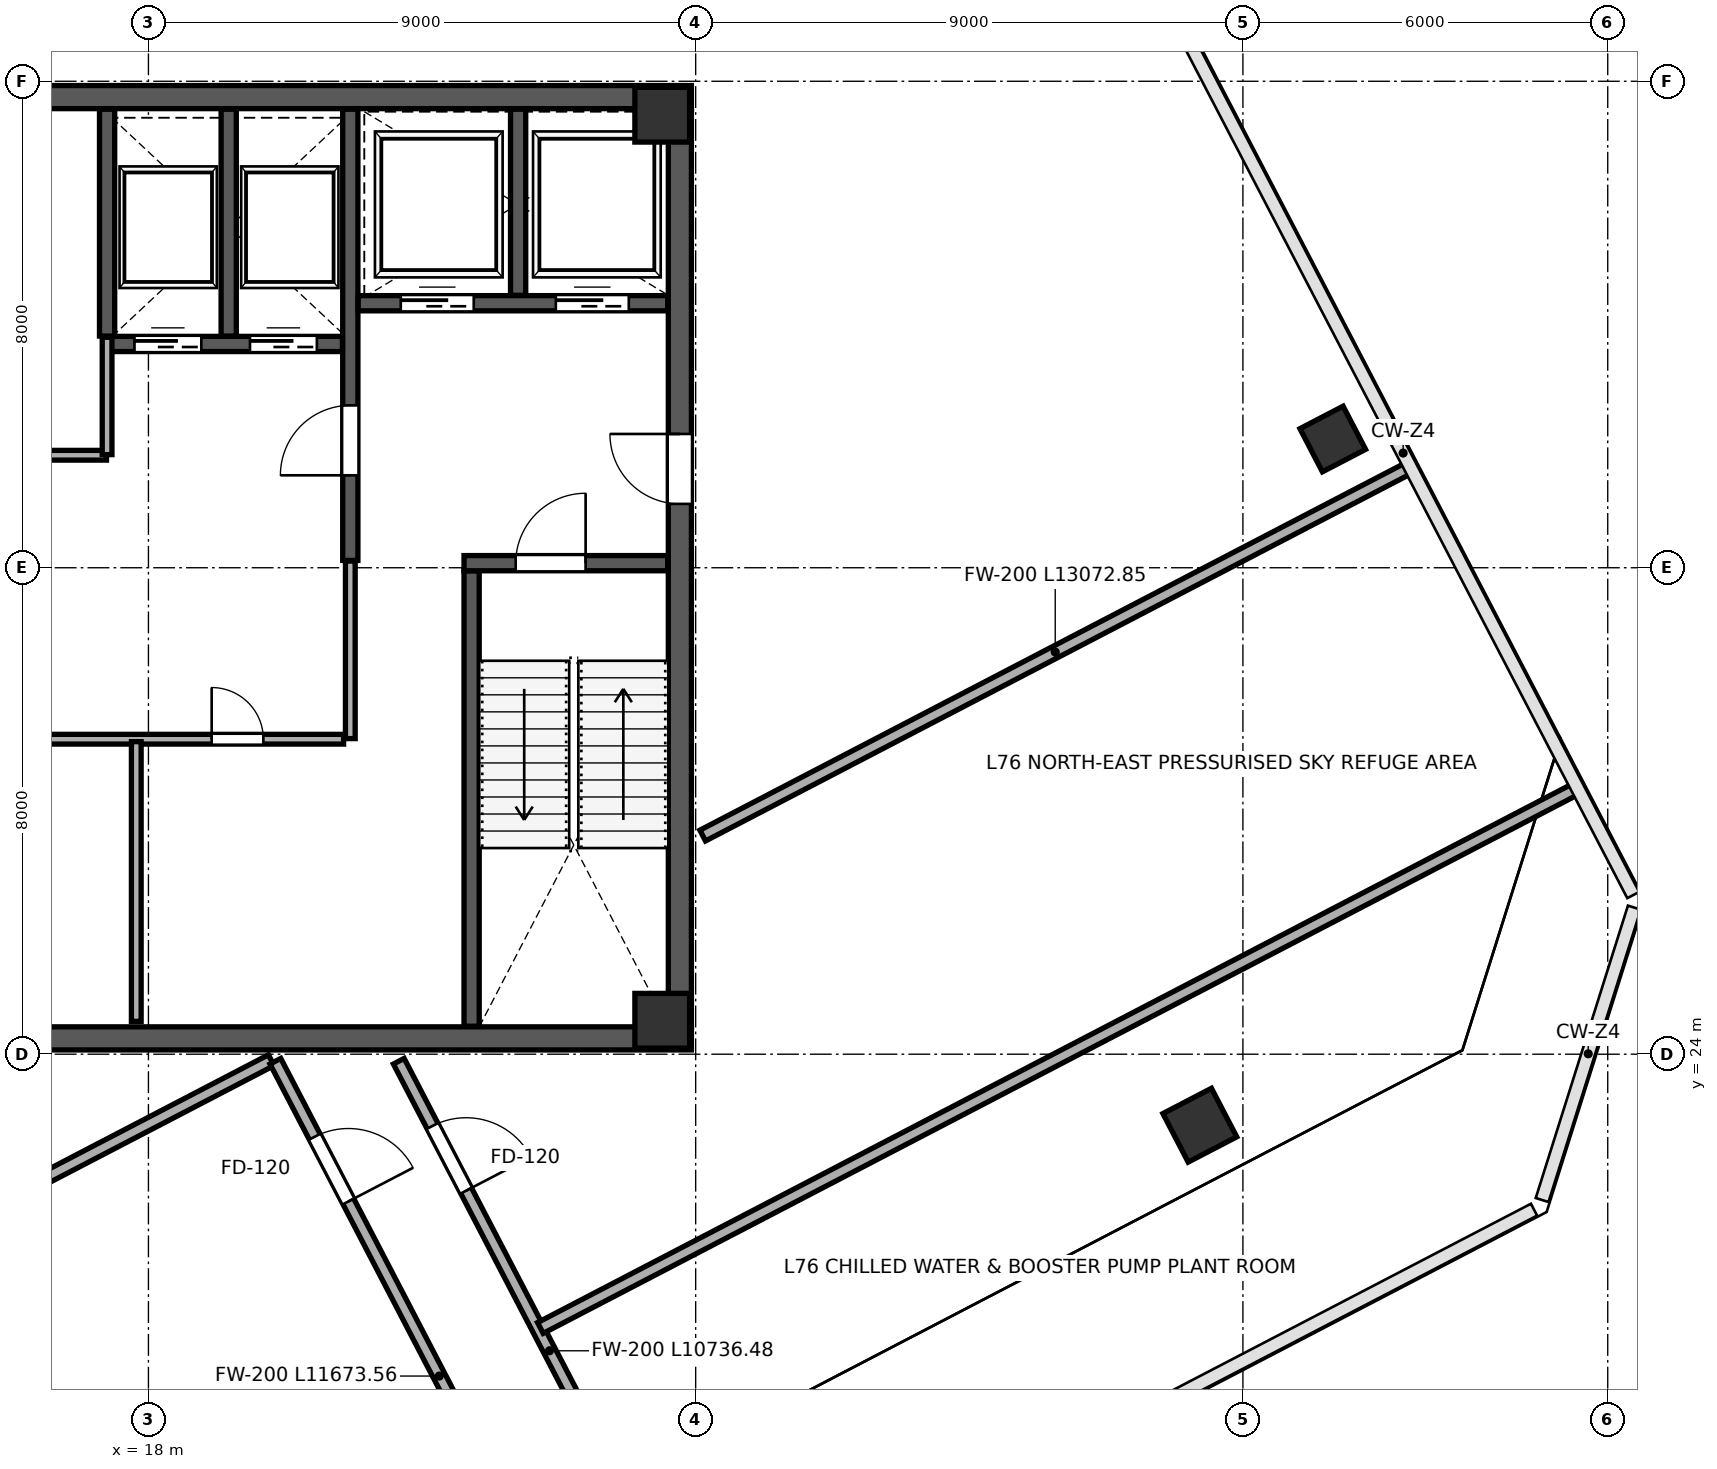
"""IFC4 building model, lengths in metres.
Left out: names, types, materials, properties, quantities, classifications, styles, units other than length and angle.
Written with IfcOpenShell. Run it as: python <this file> out.ifc"""

import sys

from ifc_helpers import new_model, si_unit, direction, frame, frame_2d, origin, origin_2d, place, context, subcontext, project, spatial, rectangle, extrude, clip, halfspace, source, transform, mapped, element, fill, save


model = new_model("IFC4")
c1 = context("Model", 3, precision=1e-05, world=origin(), true_north=direction((0.0, 1.0)))
c2 = subcontext(c1, "Body", "Model", "MODEL_VIEW")
j1 = project(units=[si_unit("LENGTHUNIT", "METRE"), si_unit("PLANEANGLEUNIT", "RADIAN")], contexts=[c1])
p1 = place(None, origin())
s1 = spatial("IfcSite", under=j1, at=p1, CompositionType="ELEMENT")
p2 = place(p1, origin())
s2 = spatial("IfcBuilding", under=s1, at=p2, CompositionType="ELEMENT")
p3 = place(p2, frame((0.0, 0.0, 336.6)))
s3 = spatial("IfcBuildingStorey", under=s2, at=p3, CompositionType="ELEMENT", Elevation=336.6)
m1 = source(origin(), c2, "Body", "SweptSolid", [
    extrude(rectangle(XDim=0.9, YDim=0.9, at=origin_2d()), origin(), (0.0, 0.0, 1.0), 4.198),
])
for number, where, z_axis, x_axis in (
    (1, (26.45, 24.55, 0.001), (0.0, 0.0, 1.0), (1.0, 0.0, 0.0)),
    (2, (26.45, 39.45, 0.001), (0.0, 0.0, 1.0), (1.0, 0.0, 0.0)),
):
    element("IfcColumn", number, at=place(p3, frame(where, z_axis=z_axis, x_axis=x_axis)), inside=s3, PredefinedType="COLUMN", context=c2, shape_type="MappedRepresentation", body=[
        mapped(m1, transform((0.0, 0.0, 0.0), scale=1.0)),
    ])
p4 = place(p3, frame((37.478, 34.117, 0.0), z_axis=(0.018116698003, -0.164139577159, 0.986270746024), x_axis=(-0.55493718977, 0.818894980127, 0.146477735283)))
e3 = element("IfcColumn", 3, at=p4, inside=s3, PredefinedType="COLUMN", context=c2, shape_type="Clipping", body=[
    clip(clip(extrude(rectangle(XDim=0.8, YDim=0.8, at=origin_2d()), origin(), (0.0, 0.0, 1.0), 4.258), halfspace(frame((0.0, 0.0, 0.091), z_axis=(0.0, 0.0, -1.0), x_axis=(1.0, 0.0, 0.0)), False)), halfspace(frame((0.0, 0.0, 4.167), z_axis=(0.0, 0.0, 1.0), x_axis=(1.0, 0.0, 0.0)), False)),
])
p5 = place(p3, frame((35.292, 22.832, 0.0), z_axis=(-0.096931121097, -0.139095013017, 0.985523685721), x_axis=(0.120960440778, 0.981200217572, 0.150381863283)))
e4 = element("IfcColumn", 4, at=p5, inside=s3, PredefinedType="COLUMN", context=c2, shape_type="Clipping", body=[
    clip(clip(extrude(rectangle(XDim=0.9, YDim=0.9, at=origin_2d()), origin(), (0.0, 0.0, 1.0), 4.262), halfspace(frame((0.0, 0.0, 0.105), z_axis=(0.0, 0.0, -1.0), x_axis=(1.0, 0.0, 0.0)), False)), halfspace(frame((0.0, 0.0, 4.156), z_axis=(0.0, 0.0, 1.0), x_axis=(1.0, 0.0, 0.0)), False)),
])
p6 = place(p3, frame((26.74, 24.45, 0.0), z_axis=(0.0, 0.0, 1.0), x_axis=(0.0, 1.0, 0.0)))
e5 = element("IfcWall", 5, at=p6, inside=s3, PredefinedType="SHEAR", context=c2, shape_type="SweptSolid", body=[
    extrude(rectangle(XDim=15.1, YDim=0.38, at=frame_2d((7.55, 0.0))), origin(), (0.0, 0.0, 1.0), 3.96),
])
p7 = place(p6, frame((8.6, 0.0, 0.0)))
e6 = element("IfcOpeningElement", 6, at=p7, cuts=e5, PredefinedType="OPENING", context=c2, shape_type="SweptSolid", body=[
    extrude(rectangle(XDim=1.15, YDim=2.2, at=frame_2d((0.575, 1.1))), frame((0.0, 0.2, 0.0), z_axis=(0.0, -1.0, 0.0), x_axis=(1.0, 0.0, 0.0)), (0.0, 0.0, 1.0), 0.4),
])
for number, where, z_axis, x_axis in (
    (7, (9.07, 24.26, 0.0), (0.0, 0.0, 1.0), (1.0, 0.0, 0.0)),
    (8, (9.07, 39.74, 0.0), (0.0, 0.0, 1.0), (1.0, 0.0, 0.0)),
):
    element("IfcWall", number, at=place(p3, frame(where, z_axis=z_axis, x_axis=x_axis)), inside=s3, PredefinedType="SHEAR", context=c2, shape_type="SweptSolid", body=[
        extrude(rectangle(XDim=17.86, YDim=0.38, at=frame_2d((8.93, 0.0))), origin(), (0.0, 0.0, 1.0), 3.96),
    ])
p8 = place(p3, frame((23.315, 24.46, 0.0), z_axis=(0.0, 0.0, 1.0), x_axis=(0.0, 1.0, 0.0)))
e9 = element("IfcWall", 9, at=p8, inside=s3, PredefinedType="SHEAR", context=c2, shape_type="SweptSolid", body=[
    extrude(rectangle(XDim=7.49, YDim=0.25, at=frame_2d((3.745, 0.0))), origin(), (0.0, 0.0, 1.0), 3.96),
])
p9 = place(p3, frame((23.19, 32.075, 0.0), z_axis=(0.0, 0.0, 1.0), x_axis=(1.0, 0.0, 0.0)))
e10 = element("IfcWall", 10, at=p9, inside=s3, PredefinedType="SHEAR", context=c2, shape_type="SweptSolid", body=[
    extrude(rectangle(XDim=3.35, YDim=0.25, at=frame_2d((1.675, 0.0))), origin(), (0.0, 0.0, 1.0), 3.96),
])
p10 = place(p9, frame((0.85, 0.0, 0.0)))
e11 = element("IfcOpeningElement", 11, at=p10, cuts=e10, PredefinedType="OPENING", context=c2, shape_type="SweptSolid", body=[
    extrude(rectangle(XDim=1.15, YDim=2.2, at=frame_2d((0.575, 1.1))), frame((0.0, 0.135, 0.0), z_axis=(0.0, -1.0, 0.0), x_axis=(1.0, 0.0, 0.0)), (0.0, 0.0, 1.0), 0.27),
])
p11 = place(p3, frame((21.32, 32.12, 0.0), z_axis=(0.0, 0.0, 1.0), x_axis=(0.0, 1.0, 0.0)))
e12 = element("IfcWall", 12, at=p11, inside=s3, PredefinedType="SHEAR", context=c2, shape_type="SweptSolid", body=[
    extrude(rectangle(XDim=7.42, YDim=0.25, at=frame_2d((3.71, 0.0))), origin(), (0.0, 0.0, 1.0), 3.96),
])
p12 = place(p11, frame((1.4, 0.0, 0.0)))
e13 = element("IfcOpeningElement", 13, at=p12, cuts=e12, PredefinedType="OPENING", context=c2, shape_type="SweptSolid", body=[
    extrude(rectangle(XDim=1.15, YDim=2.2, at=frame_2d((0.575, 1.1))), frame((0.0, 0.135, 0.0), z_axis=(0.0, -1.0, 0.0), x_axis=(1.0, 0.0, 0.0)), (0.0, 0.0, 1.0), 0.27),
])
p13 = place(p3, frame((21.45, 36.35, 0.0), z_axis=(0.0, 0.0, 1.0), x_axis=(1.0, 0.0, 0.0)))
e14 = element("IfcWall", 14, at=p13, inside=s3, PredefinedType="SHEAR", context=c2, shape_type="SweptSolid", body=[
    extrude(rectangle(XDim=5.09, YDim=0.25, at=frame_2d((2.545, 0.0))), origin(), (0.0, 0.0, 1.0), 3.96),
])
p14 = place(p13, frame((0.7, 0.0, 0.0)))
e15 = element("IfcOpeningElement", 15, at=p14, cuts=e14, PredefinedType="OPENING", context=c2, shape_type="SweptSolid", body=[
    extrude(rectangle(XDim=1.2, YDim=2.2, at=frame_2d((0.6, 1.1))), frame((0.0, 0.135, 0.0), z_axis=(0.0, -1.0, 0.0), x_axis=(1.0, 0.0, 0.0)), (0.0, 0.0, 1.0), 0.27),
])
p15 = place(p13, frame((3.25, 0.0, 0.0)))
e16 = element("IfcOpeningElement", 16, at=p15, cuts=e14, PredefinedType="OPENING", context=c2, shape_type="SweptSolid", body=[
    extrude(rectangle(XDim=1.2, YDim=2.2, at=frame_2d((0.6, 1.1))), frame((0.0, 0.135, 0.0), z_axis=(0.0, -1.0, 0.0), x_axis=(1.0, 0.0, 0.0)), (0.0, 0.0, 1.0), 0.27),
])
p16 = place(p3, frame((24.08, 36.48, 0.0), z_axis=(0.0, 0.0, 1.0), x_axis=(0.0, 1.0, 0.0)))
e17 = element("IfcWall", 17, at=p16, inside=s3, PredefinedType="SHEAR", context=c2, shape_type="SweptSolid", body=[
    extrude(rectangle(XDim=3.06, YDim=0.25, at=frame_2d((1.53, 0.0))), origin(), (0.0, 0.0, 1.0), 3.96),
])
p17 = place(p3, frame((17.32, 35.68, 0.0), z_axis=(0.0, 0.0, 1.0), x_axis=(1.0, 0.0, 0.0)))
e18 = element("IfcWall", 18, at=p17, inside=s3, PredefinedType="SHEAR", context=c2, shape_type="SweptSolid", body=[
    extrude(rectangle(XDim=3.87, YDim=0.25, at=frame_2d((1.935, 0.0))), origin(), (0.0, 0.0, 1.0), 3.96),
])
p18 = place(p17, frame((0.45, 0.0, 0.0)))
e19 = element("IfcOpeningElement", 19, at=p18, cuts=e18, PredefinedType="OPENING", context=c2, shape_type="SweptSolid", body=[
    extrude(rectangle(XDim=1.1, YDim=2.2, at=frame_2d((0.55, 1.1))), frame((0.0, 0.135, 0.0), z_axis=(0.0, -1.0, 0.0), x_axis=(1.0, 0.0, 0.0)), (0.0, 0.0, 1.0), 0.27),
])
p19 = place(p17, frame((2.35, 0.0, 0.0)))
e20 = element("IfcOpeningElement", 20, at=p19, cuts=e18, PredefinedType="OPENING", context=c2, shape_type="SweptSolid", body=[
    extrude(rectangle(XDim=1.1, YDim=2.2, at=frame_2d((0.55, 1.1))), frame((0.0, 0.135, 0.0), z_axis=(0.0, -1.0, 0.0), x_axis=(1.0, 0.0, 0.0)), (0.0, 0.0, 1.0), 0.27),
])
for number, where, z_axis, x_axis in (
    (21, (17.32, 35.81, 0.0), (0.0, 0.0, 1.0), (0.0, 1.0, 0.0)),
    (22, (19.32, 35.81, 0.0), (0.0, 0.0, 1.0), (0.0, 1.0, 0.0)),
):
    element("IfcWall", number, at=place(p3, frame(where, z_axis=z_axis, x_axis=x_axis)), inside=s3, PredefinedType="SHEAR", context=c2, shape_type="SweptSolid", body=[
        extrude(rectangle(XDim=3.73, YDim=0.25, at=frame_2d((1.865, 0.0))), origin(), (0.0, 0.0, 1.0), 3.96),
    ])
p20 = place(p3, frame((13.21, 33.85, 0.0), z_axis=(0.0, 0.0, 1.0), x_axis=(1.0, 0.0, 0.0)))
e23 = element("IfcWall", 23, at=p20, inside=s3, PredefinedType="PARTITIONING", context=c2, shape_type="SweptSolid", body=[
    extrude(rectangle(XDim=4.1, YDim=0.16, at=frame_2d((2.05, 0.0))), origin(), (0.0, 0.0, 1.0), 3.96),
])
p21 = place(p20, frame((1.35, 0.0, 0.0)))
e24 = element("IfcOpeningElement", 24, at=p21, cuts=e23, PredefinedType="OPENING", context=c2, shape_type="SweptSolid", body=[
    extrude(rectangle(XDim=0.9, YDim=2.15, at=frame_2d((0.45, 1.075))), frame((0.0, 0.09, 0.0), z_axis=(0.0, -1.0, 0.0), x_axis=(1.0, 0.0, 0.0)), (0.0, 0.0, 1.0), 0.18),
])
p22 = place(p3, frame((17.32, 33.86, 0.0), z_axis=(0.0, 0.0, 1.0), x_axis=(0.0, 1.0, 0.0)))
e25 = element("IfcWall", 25, at=p22, inside=s3, PredefinedType="PARTITIONING", context=c2, shape_type="SweptSolid", body=[
    extrude(rectangle(XDim=1.93, YDim=0.16, at=frame_2d((0.965, 0.0))), origin(), (0.0, 0.0, 1.0), 3.96),
])
p23 = place(p3, frame((12.84, 29.18, 0.0), z_axis=(0.0, 0.0, 1.0), x_axis=(1.0, 0.0, 0.0)))
e26 = element("IfcWall", 26, at=p23, inside=s3, PredefinedType="PARTITIONING", context=c2, shape_type="SweptSolid", body=[
    extrude(rectangle(XDim=8.37, YDim=0.16, at=frame_2d((4.185, 0.0))), origin(), (0.0, 0.0, 1.0), 3.96),
])
p24 = place(p23, frame((2.1, 0.0, 0.0)))
e27 = element("IfcOpeningElement", 27, at=p24, cuts=e26, PredefinedType="OPENING", context=c2, shape_type="SweptSolid", body=[
    extrude(rectangle(XDim=0.9, YDim=2.15, at=frame_2d((0.45, 1.075))), frame((0.0, 0.09, 0.0), z_axis=(0.0, -1.0, 0.0), x_axis=(1.0, 0.0, 0.0)), (0.0, 0.0, 1.0), 0.18),
])
p25 = place(p23, frame((6.2, 0.0, 0.0)))
e28 = element("IfcOpeningElement", 28, at=p25, cuts=e26, PredefinedType="OPENING", context=c2, shape_type="SweptSolid", body=[
    extrude(rectangle(XDim=0.85, YDim=2.1, at=frame_2d((0.425, 1.05))), frame((0.0, 0.09, 0.0), z_axis=(0.0, -1.0, 0.0), x_axis=(1.0, 0.0, 0.0)), (0.0, 0.0, 1.0), 0.18),
])
p26 = place(p3, frame((17.8, 24.54, 0.0), z_axis=(0.0, 0.0, 1.0), x_axis=(0.0, 1.0, 0.0)))
e29 = element("IfcWall", 29, at=p26, inside=s3, PredefinedType="PARTITIONING", context=c2, shape_type="SweptSolid", body=[
    extrude(rectangle(XDim=4.6, YDim=0.16, at=frame_2d((2.3, 0.0))), origin(), (0.0, 0.0, 1.0), 3.96),
])
p27 = place(p3, frame((21.32, 29.19, 0.0), z_axis=(0.0, 0.0, 1.0), x_axis=(0.0, 1.0, 0.0)))
e30 = element("IfcWall", 30, at=p27, inside=s3, PredefinedType="PARTITIONING", context=c2, shape_type="SweptSolid", body=[
    extrude(rectangle(XDim=2.92, YDim=0.16, at=frame_2d((1.46, 0.0))), origin(), (0.0, 0.0, 1.0), 3.96),
])
p28 = place(p3, frame((8.569, 17.94, 0.0), z_axis=(0.0, 0.0, 1.0), x_axis=(0.88700833088, 0.461753420073, 0.0)))
e31 = element("IfcWall", 31, at=p28, inside=s3, PredefinedType="SOLIDWALL", context=c2, shape_type="SweptSolid", body=[
    extrude(rectangle(XDim=12.91, YDim=0.2, at=frame_2d((6.455, 0.0))), origin(), (0.0, 0.0, 1.0), 3.96),
])
p29 = place(p3, frame((20.088, 23.885, 0.0), z_axis=(0.0, 0.0, 1.0), x_axis=(0.461735279655, -0.887017774073, 0.0)))
e32 = element("IfcWall", 32, at=p29, inside=s3, PredefinedType="SOLIDWALL", context=c2, shape_type="SweptSolid", body=[
    extrude(rectangle(XDim=11.674, YDim=0.2, at=frame_2d((5.837, 0.0))), origin(), (0.0, 0.0, 1.0), 3.96),
])
p30 = place(p29, frame((1.4, 0.0, 0.0)))
e33 = element("IfcOpeningElement", 33, at=p30, cuts=e32, PredefinedType="OPENING", context=c2, shape_type="SweptSolid", body=[
    extrude(rectangle(XDim=1.2, YDim=2.2, at=frame_2d((0.6, 1.1))), frame((0.0, 0.11, 0.0), z_axis=(0.0, -1.0, 0.0), x_axis=(1.0, 0.0, 0.0)), (0.0, 0.0, 1.0), 0.22),
])
p31 = place(p3, frame((27.115, 27.595, 0.0), z_axis=(0.0, 0.0, 1.0), x_axis=(0.887009705962, 0.46175077859, 0.0)))
e34 = element("IfcWall", 34, at=p31, inside=s3, PredefinedType="SOLIDWALL", context=c2, shape_type="SweptSolid", body=[
    extrude(rectangle(XDim=13.073, YDim=0.2, at=frame_2d((6.536, 0.0))), origin(), (0.0, 0.0, 1.0), 3.295),
])
p32 = place(p3, frame((22.117, 23.885, 0.0), z_axis=(0.0, 0.0, 1.0), x_axis=(0.461743612554, -0.88701343635, 0.0)))
e35 = element("IfcWall", 35, at=p32, inside=s3, PredefinedType="SOLIDWALL", context=c2, shape_type="SweptSolid", body=[
    extrude(rectangle(XDim=10.737, YDim=0.2, at=frame_2d((5.368, 0.0))), origin(), (0.0, 0.0, 1.0), 3.96),
])
p33 = place(p32, frame((1.2, 0.0, 0.0)))
e36 = element("IfcOpeningElement", 36, at=p33, cuts=e35, PredefinedType="OPENING", context=c2, shape_type="SweptSolid", body=[
    extrude(rectangle(XDim=1.2, YDim=2.2, at=frame_2d((0.6, 1.1))), frame((0.0, 0.11, 0.0), z_axis=(0.0, -1.0, 0.0), x_axis=(1.0, 0.0, 0.0)), (0.0, 0.0, 1.0), 0.22),
])
p34 = place(p32, frame((7.35, 0.0, 0.0)))
e37 = element("IfcOpeningElement", 37, at=p34, cuts=e35, PredefinedType="OPENING", context=c2, shape_type="SweptSolid", body=[
    extrude(rectangle(XDim=1.2, YDim=2.2, at=frame_2d((0.6, 1.1))), frame((0.0, 0.11, 0.0), z_axis=(0.0, -1.0, 0.0), x_axis=(1.0, 0.0, 0.0)), (0.0, 0.0, 1.0), 0.22),
])
p35 = place(p3, frame((24.446, 19.498, 0.0), z_axis=(0.0, 0.0, 1.0), x_axis=(0.887009346917, 0.461751468304, 0.0)))
e38 = element("IfcWall", 38, at=p35, inside=s3, PredefinedType="SOLIDWALL", context=c2, shape_type="SweptSolid", body=[
    extrude(rectangle(XDim=19.18, YDim=0.2, at=frame_2d((9.59, 0.0))), origin(), (0.0, 0.0, 1.0), 3.96),
])
p36 = place(p3, frame((11.394, 40.098, 0.0), z_axis=(0.0, 0.0, 1.0), x_axis=(0.887004496891, 0.461760784925, 0.0)))
e39 = element("IfcWall", 39, at=p36, inside=s3, PredefinedType="SOLIDWALL", context=c2, shape_type="SweptSolid", body=[
    extrude(rectangle(XDim=15.785, YDim=0.2, at=frame_2d((7.893, 0.0))), origin(), (0.0, 0.0, 1.0), 3.96),
])
p37 = place(p36, frame((13.56, 0.0, 0.0)))
e40 = element("IfcOpeningElement", 40, at=p37, cuts=e39, PredefinedType="OPENING", context=c2, shape_type="SweptSolid", body=[
    extrude(rectangle(XDim=1.2, YDim=2.2, at=frame_2d((0.6, 1.1))), frame((0.0, 0.11, 0.0), z_axis=(0.0, -1.0, 0.0), x_axis=(1.0, 0.0, 0.0)), (0.0, 0.0, 1.0), 0.22),
])
m2 = source(origin(), c2, "Body", "SweptSolid", [
    extrude(rectangle(XDim=1.15, YDim=2.2, at=frame_2d((0.575, 1.1))), frame((0.0, 0.025, 0.0), z_axis=(0.0, -1.0, 0.0), x_axis=(1.0, 0.0, 0.0)), (0.0, 0.0, 1.0), 0.05),
])
p38 = place(p12, origin())
e41 = element("IfcDoor", 41, at=p38, inside=s3, OperationType="SINGLE_SWING_LEFT", PredefinedType="DOOR", context=c2, shape_type="MappedRepresentation", body=[
    mapped(m2, transform((0.0, 0.0, 0.0), scale=1.0)),
])
fill(e13, e41)
m3 = source(origin(), c2, "Body", "SweptSolid", [
    extrude(rectangle(XDim=1.15, YDim=2.2, at=frame_2d((0.575, 1.1))), frame((0.0, 0.025, 0.0), z_axis=(0.0, -1.0, 0.0), x_axis=(1.0, 0.0, 0.0)), (0.0, 0.0, 1.0), 0.05),
])
p39 = place(p10, origin())
e42 = element("IfcDoor", 42, at=p39, inside=s3, OperationType="SINGLE_SWING_RIGHT", PredefinedType="DOOR", context=c2, shape_type="MappedRepresentation", body=[
    mapped(m3, transform((0.0, 0.0, 0.0), scale=1.0)),
])
fill(e11, e42)
p40 = place(p7, origin())
e43 = element("IfcDoor", 43, at=p40, inside=s3, OperationType="SINGLE_SWING_RIGHT", PredefinedType="DOOR", context=c2, shape_type="MappedRepresentation", body=[
    mapped(m2, transform((0.0, 0.0, 0.0), scale=1.0)),
])
fill(e6, e43)
m4 = source(origin(), c2, "Body", "SweptSolid", [
    extrude(rectangle(XDim=1.1, YDim=2.2, at=frame_2d((0.55, 1.1))), frame((0.0, 0.025, 0.0), z_axis=(0.0, -1.0, 0.0), x_axis=(1.0, 0.0, 0.0)), (0.0, 0.0, 1.0), 0.05),
])
p41 = place(p18, origin())
e44 = element("IfcDoor", 44, at=p41, inside=s3, OperationType="SLIDING_TO_LEFT", PredefinedType="DOOR", context=c2, shape_type="MappedRepresentation", body=[
    mapped(m4, transform((0.0, 0.0, 0.0), scale=1.0)),
])
fill(e19, e44)
p42 = place(p19, origin())
e45 = element("IfcDoor", 45, at=p42, inside=s3, OperationType="SLIDING_TO_RIGHT", PredefinedType="DOOR", context=c2, shape_type="MappedRepresentation", body=[
    mapped(m4, transform((0.0, 0.0, 0.0), scale=1.0)),
])
fill(e20, e45)
m5 = source(origin(), c2, "Body", "SweptSolid", [
    extrude(rectangle(XDim=1.2, YDim=2.2, at=frame_2d((0.6, 1.1))), frame((0.0, 0.025, 0.0), z_axis=(0.0, -1.0, 0.0), x_axis=(1.0, 0.0, 0.0)), (0.0, 0.0, 1.0), 0.05),
])
p43 = place(p14, origin())
e46 = element("IfcDoor", 46, at=p43, inside=s3, OperationType="SLIDING_TO_LEFT", PredefinedType="DOOR", context=c2, shape_type="MappedRepresentation", body=[
    mapped(m5, transform((0.0, 0.0, 0.0), scale=1.0)),
])
fill(e15, e46)
p44 = place(p15, origin())
e47 = element("IfcDoor", 47, at=p44, inside=s3, OperationType="SLIDING_TO_RIGHT", PredefinedType="DOOR", context=c2, shape_type="MappedRepresentation", body=[
    mapped(m5, transform((0.0, 0.0, 0.0), scale=1.0)),
])
fill(e16, e47)
m6 = source(origin(), c2, "Body", "SweptSolid", [
    extrude(rectangle(XDim=0.85, YDim=2.1, at=frame_2d((0.425, 1.05))), frame((0.0, 0.025, 0.0), z_axis=(0.0, -1.0, 0.0), x_axis=(1.0, 0.0, 0.0)), (0.0, 0.0, 1.0), 0.05),
])
p45 = place(p25, origin())
e48 = element("IfcDoor", 48, at=p45, inside=s3, OperationType="SINGLE_SWING_LEFT", PredefinedType="DOOR", context=c2, shape_type="MappedRepresentation", body=[
    mapped(m6, transform((0.0, 0.0, 0.0), scale=1.0)),
])
fill(e28, e48)
m7 = source(origin(), c2, "Body", "SweptSolid", [
    extrude(rectangle(XDim=1.2, YDim=2.2, at=frame_2d((0.6, 1.1))), frame((0.0, 0.025, 0.0), z_axis=(0.0, -1.0, 0.0), x_axis=(1.0, 0.0, 0.0)), (0.0, 0.0, 1.0), 0.05),
])
p46 = place(p30, origin())
e49 = element("IfcDoor", 49, at=p46, inside=s3, OperationType="SINGLE_SWING_RIGHT", PredefinedType="DOOR", context=c2, shape_type="MappedRepresentation", body=[
    mapped(m7, transform((0.0, 0.0, 0.0), scale=1.0)),
])
fill(e33, e49)
p47 = place(p33, origin())
e50 = element("IfcDoor", 50, at=p47, inside=s3, OperationType="SINGLE_SWING_RIGHT", PredefinedType="DOOR", context=c2, shape_type="MappedRepresentation", body=[
    mapped(m7, transform((0.0, 0.0, 0.0), scale=1.0)),
])
fill(e36, e50)
save(model, sys.argv[1])
